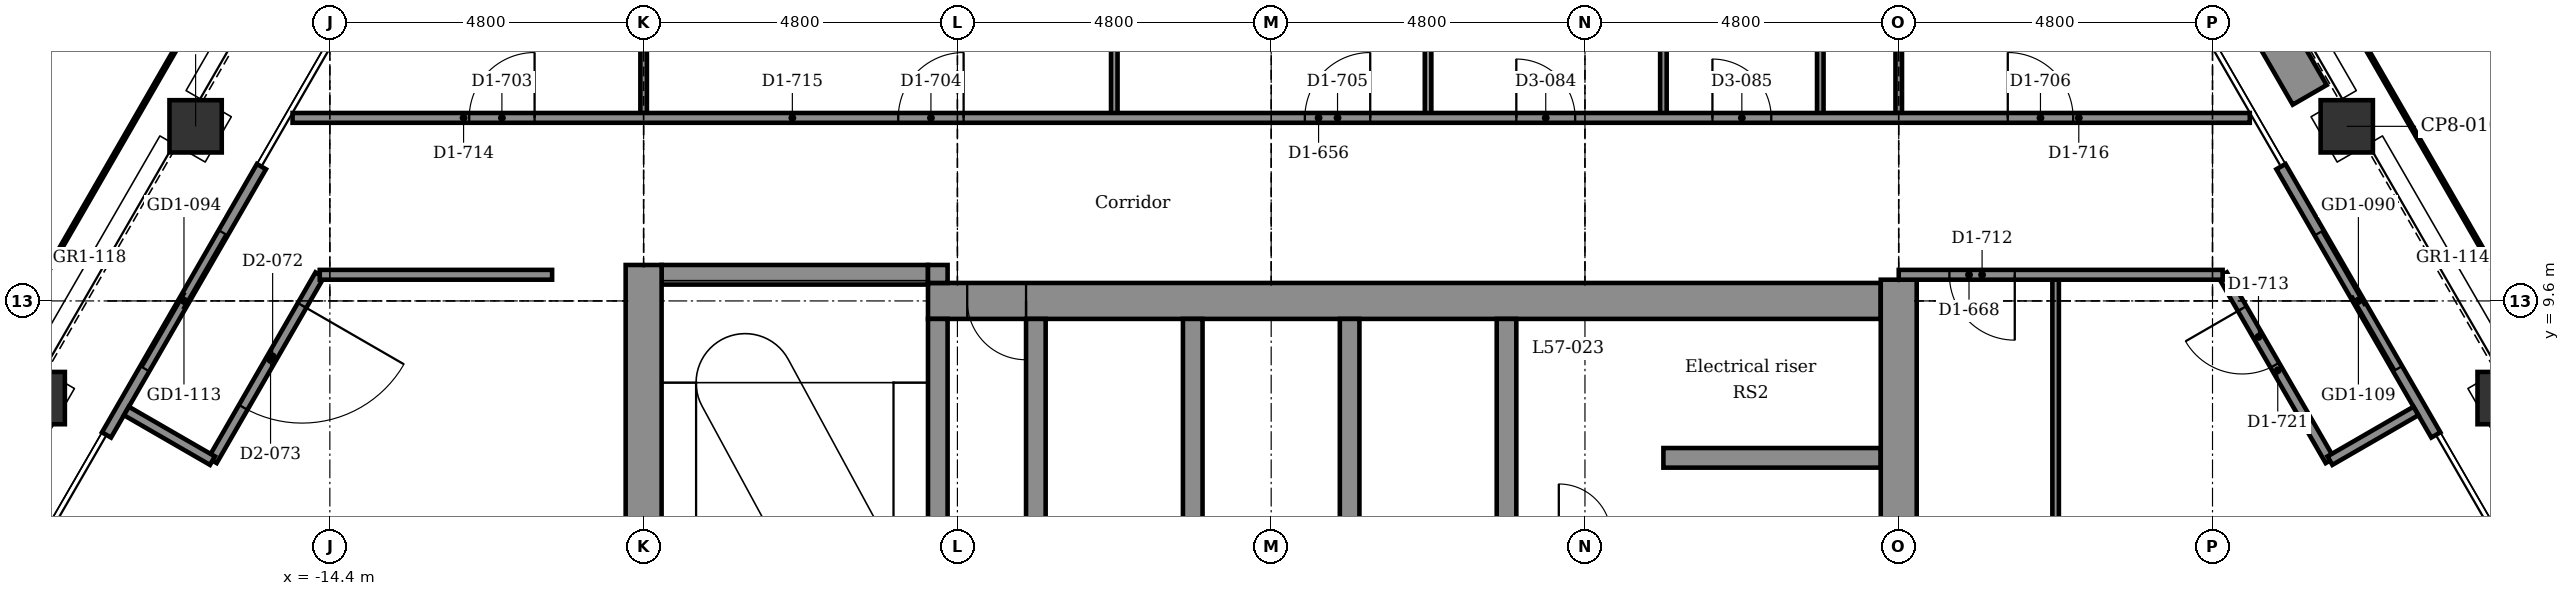
"""IFC4 building model, lengths in metres.
Left out: names, types, materials, properties, quantities, classifications, styles, units other than length and angle.
Written with IfcOpenShell. Run it as: python <this file> out.ifc"""

import sys

from ifc_helpers import new_model, si_unit, direction, frame, frame_2d, origin, origin_2d, place, context, subcontext, project, spatial, rectangle, extrude, element, fill, save


model = new_model("IFC4")
c1 = context("Model", 3, precision=1e-05, world=origin(), true_north=direction((0.0, 1.0)))
c2 = subcontext(c1, "Body", "Model", "MODEL_VIEW")
j1 = project(units=[si_unit("LENGTHUNIT", "METRE"), si_unit("PLANEANGLEUNIT", "RADIAN")], contexts=[c1])
p1 = place(None, origin())
s1 = spatial("IfcSite", under=j1, at=p1, CompositionType="ELEMENT")
p2 = place(p1, origin())
s2 = spatial("IfcBuilding", under=s1, at=p2, CompositionType="ELEMENT")
p3 = place(p2, frame((0.0, 0.0, 257.9)))
s3 = spatial("IfcBuildingStorey", under=s2, at=p3, CompositionType="ELEMENT", Elevation=257.9)
for number, where, z_axis, x_axis in (
    (1, (16.454, 12.271, -0.15), (0.0, 0.0, 1.0), (0.866, 0.5, 0.0)),
    (2, (18.854, 8.114, -0.15), (0.0, 0.0, 1.0), (0.866, 0.5, 0.0)),
    (3, (-18.854, 8.114, -0.15), (0.0, 0.0, 1.0), (0.5, 0.866, 0.0)),
    (4, (-16.454, 12.271, -0.15), (0.0, 0.0, 1.0), (0.5, 0.866, 0.0)),
):
    element("IfcColumn", number, at=place(p3, frame(where, z_axis=z_axis, x_axis=x_axis)), inside=s3, PredefinedType="COLUMN", context=c2, shape_type="SweptSolid", body=[
        extrude(rectangle(XDim=0.8, YDim=0.8, at=origin_2d()), origin(), (0.0, 0.0, 1.0), 3.9),
    ])
p4 = place(p3, frame((6.0, 7.2, -0.15), z_axis=(0.0, 0.0, 1.0), x_axis=(1.0, 0.0, 0.0)))
e5 = element("IfcWall", 5, at=p4, inside=s3, PredefinedType="STANDARD", context=c2, shape_type="SweptSolid", body=[
    extrude(rectangle(XDim=3.325, YDim=0.3, at=frame_2d((1.663, 0.0))), origin(), (0.0, 0.0, 1.0), 3.9),
])
p5 = place(p3, frame((-5.25, 9.6, -0.15), z_axis=(0.0, 0.0, 1.0), x_axis=(1.0, 0.0, 0.0)))
e6 = element("IfcWall", 6, at=p5, inside=s3, PredefinedType="SHEAR", context=c2, shape_type="SweptSolid", body=[
    extrude(rectangle(XDim=14.575, YDim=0.55, at=frame_2d((7.288, 0.0))), origin(), (0.0, 0.0, 1.0), 3.9),
])
p6 = place(p5, frame((0.6, 0.0, 0.15)))
e7 = element("IfcOpeningElement", 7, at=p6, cuts=e6, PredefinedType="OPENING", context=c2, shape_type="SweptSolid", body=[
    extrude(rectangle(XDim=0.9, YDim=2.1, at=frame_2d((0.45, 1.05))), frame((0.0, 0.285, 0.0), z_axis=(0.0, -1.0, 0.0), x_axis=(1.0, 0.0, 0.0)), (0.0, 0.0, 1.0), 0.57),
])
p7 = place(p3, frame((-9.325, 10.0, -0.15), z_axis=(0.0, 0.0, 1.0), x_axis=(1.0, 0.0, 0.0)))
e8 = element("IfcWall", 8, at=p7, inside=s3, PredefinedType="STANDARD", context=c2, shape_type="SweptSolid", body=[
    extrude(rectangle(XDim=4.075, YDim=0.3, at=frame_2d((2.038, 0.0))), origin(), (0.0, 0.0, 1.0), 3.9),
])
p8 = place(p3, frame((-9.6, 2.55, -0.15), z_axis=(0.0, 0.0, 1.0), x_axis=(0.0, 1.0, 0.0)))
e9 = element("IfcWall", 9, at=p8, inside=s3, PredefinedType="SHEAR", context=c2, shape_type="SweptSolid", body=[
    extrude(rectangle(XDim=7.6, YDim=0.55, at=frame_2d((3.8, 0.0))), origin(), (0.0, 0.0, 1.0), 3.9),
])
p9 = place(p3, frame((-5.1, 2.25, -0.15), z_axis=(0.0, 0.0, 1.0), x_axis=(0.0, 1.0, 0.0)))
e10 = element("IfcWall", 10, at=p9, inside=s3, PredefinedType="STANDARD", context=c2, shape_type="SweptSolid", body=[
    extrude(rectangle(XDim=7.075, YDim=0.3, at=frame_2d((3.538, 0.0))), origin(), (0.0, 0.0, 1.0), 3.9),
])
p10 = place(p9, frame((2.0, 0.0, 0.15)))
e11 = element("IfcOpeningElement", 11, at=p10, cuts=e10, PredefinedType="OPENING", context=c2, shape_type="SweptSolid", body=[
    extrude(rectangle(XDim=1.2, YDim=2.1, at=frame_2d((0.6, 1.05))), frame((0.0, 0.16, 0.0), z_axis=(0.0, -1.0, 0.0), x_axis=(1.0, 0.0, 0.0)), (0.0, 0.0, 1.0), 0.32),
])
p11 = place(p3, frame((-5.1, 9.875, -0.15), z_axis=(0.0, 0.0, 1.0), x_axis=(0.0, 1.0, 0.0)))
e12 = element("IfcWall", 12, at=p11, inside=s3, PredefinedType="STANDARD", context=c2, shape_type="SweptSolid", body=[
    extrude(rectangle(XDim=0.275, YDim=0.3, at=frame_2d((0.137, 0.0))), origin(), (0.0, 0.0, 1.0), 3.9),
])
for number, where, z_axis, x_axis in (
    (13, (-3.6, 5.85, -0.15), (0.0, 0.0, 1.0), (0.0, 1.0, 0.0)),
    (14, (-1.2, 5.85, -0.15), (0.0, 0.0, 1.0), (0.0, 1.0, 0.0)),
    (15, (1.2, 5.85, -0.15), (0.0, 0.0, 1.0), (0.0, 1.0, 0.0)),
    (16, (3.6, 5.85, -0.15), (0.0, 0.0, 1.0), (0.0, 1.0, 0.0)),
):
    element("IfcWall", number, at=place(p3, frame(where, z_axis=z_axis, x_axis=x_axis)), inside=s3, PredefinedType="STANDARD", context=c2, shape_type="SweptSolid", body=[
        extrude(rectangle(XDim=3.475, YDim=0.3, at=frame_2d((1.737, 0.0))), origin(), (0.0, 0.0, 1.0), 3.9),
    ])
p12 = place(p3, frame((9.6, -10.15, -0.15), z_axis=(0.0, 0.0, 1.0), x_axis=(0.0, 1.0, 0.0)))
e17 = element("IfcWall", 17, at=p12, inside=s3, PredefinedType="SHEAR", context=c2, shape_type="SweptSolid", body=[
    extrude(rectangle(XDim=20.075, YDim=0.55, at=frame_2d((10.038, 0.0))), origin(), (0.0, 0.0, 1.0), 3.9),
])
p13 = place(p3, frame((15.447, 11.655, 0.0), z_axis=(0.0, 0.0, 1.0), x_axis=(0.499978080042, -0.866038058908, 0.0)))
e18 = element("IfcWall", 18, at=p13, inside=s3, PredefinedType="PARTITIONING", context=c2, shape_type="SweptSolid", body=[
    extrude(rectangle(XDim=4.74, YDim=0.16, at=frame_2d((2.37, 0.0))), origin(), (0.0, 0.0, 1.0), 3.75),
])
p14 = place(p13, frame((1.17, 0.0, 0.0)))
e19 = element("IfcOpeningElement", 19, at=p14, cuts=e18, PredefinedType="OPENING", context=c2, shape_type="SweptSolid", body=[
    extrude(rectangle(XDim=2.4, YDim=2.4, at=frame_2d((1.2, 1.2))), frame((0.0, 0.09, 0.0), z_axis=(0.0, -1.0, 0.0), x_axis=(1.0, 0.0, 0.0)), (0.0, 0.0, 1.0), 0.18),
])
p15 = place(p3, frame((-17.817, 7.55, 0.0), z_axis=(0.0, 0.0, 1.0), x_axis=(0.499978080042, 0.866038058908, 0.0)))
e20 = element("IfcWall", 20, at=p15, inside=s3, PredefinedType="PARTITIONING", context=c2, shape_type="SweptSolid", body=[
    extrude(rectangle(XDim=4.74, YDim=0.16, at=frame_2d((2.37, 0.0))), origin(), (0.0, 0.0, 1.0), 3.75),
])
p16 = place(p15, frame((1.17, 0.0, 0.0)))
e21 = element("IfcOpeningElement", 21, at=p16, cuts=e20, PredefinedType="OPENING", context=c2, shape_type="SweptSolid", body=[
    extrude(rectangle(XDim=2.4, YDim=2.4, at=frame_2d((1.2, 1.2))), frame((0.0, 0.09, 0.0), z_axis=(0.0, -1.0, 0.0), x_axis=(1.0, 0.0, 0.0)), (0.0, 0.0, 1.0), 0.18),
])
p17 = place(p3, frame((14.187, 15.697, 0.0), z_axis=(0.0, 0.0, 1.0), x_axis=(0.499977295307, -0.866038511948, 0.0)))
e22 = element("IfcWall", 22, at=p17, inside=s3, PredefinedType="USERDEFINED", context=c2, shape_type="SweptSolid", body=[
    extrude(rectangle(XDim=3.4, YDim=0.6, at=frame_2d((1.7, 0.0))), origin(), (0.0, 0.0, 1.0), 0.7),
])
p18 = place(p3, frame((12.0, -10.0, 0.0), z_axis=(0.0, 0.0, 1.0), x_axis=(0.0, 1.0, 0.0)))
e23 = element("IfcWall", 23, at=p18, inside=s3, PredefinedType="PARTITIONING", context=c2, shape_type="SweptSolid", body=[
    extrude(rectangle(XDim=20.0, YDim=0.1, at=frame_2d((10.0, 0.0))), origin(), (0.0, 0.0, 1.0), 3.75),
])
p19 = place(p3, frame((9.6, 12.4, 0.0), z_axis=(0.0, 0.0, 1.0), x_axis=(0.0, 1.0, 0.0)))
e24 = element("IfcWall", 24, at=p19, inside=s3, PredefinedType="PARTITIONING", context=c2, shape_type="SweptSolid", body=[
    extrude(rectangle(XDim=6.715, YDim=0.1, at=frame_2d((3.357, 0.0))), origin(), (0.0, 0.0, 1.0), 3.217),
])
for number, where, z_axis, x_axis in (
    (25, (8.4, 12.4, 0.0), (0.0, 0.0, 1.0), (0.0, 1.0, 0.0)),
    (26, (6.0, 12.4, 0.0), (0.0, 0.0, 1.0), (0.0, 1.0, 0.0)),
    (27, (2.4, 12.4, 0.0), (0.0, 0.0, 1.0), (0.0, 1.0, 0.0)),
):
    element("IfcWall", number, at=place(p3, frame(where, z_axis=z_axis, x_axis=x_axis)), inside=s3, PredefinedType="PARTITIONING", context=c2, shape_type="SweptSolid", body=[
        extrude(rectangle(XDim=4.8, YDim=0.1, at=frame_2d((2.4, 0.0))), origin(), (0.0, 0.0, 1.0), 3.75),
    ])
p20 = place(p3, frame((-2.4, 12.4, 0.0), z_axis=(0.0, 0.0, 1.0), x_axis=(0.0, 1.0, 0.0)))
e28 = element("IfcWall", 28, at=p20, inside=s3, PredefinedType="PARTITIONING", context=c2, shape_type="SweptSolid", body=[
    extrude(rectangle(XDim=6.725, YDim=0.1, at=frame_2d((3.362, 0.0))), origin(), (0.0, 0.0, 1.0), 3.75),
])
p21 = place(p3, frame((-9.6, 12.4, 0.0), z_axis=(0.0, 0.0, 1.0), x_axis=(0.0, 1.0, 0.0)))
e29 = element("IfcWall", 29, at=p21, inside=s3, PredefinedType="PARTITIONING", context=c2, shape_type="SweptSolid", body=[
    extrude(rectangle(XDim=6.715, YDim=0.1, at=frame_2d((3.357, 0.0))), origin(), (0.0, 0.0, 1.0), 3.293),
])
p22 = place(p3, frame((14.555, 10.0, 0.0), z_axis=(0.0, 0.0, 1.0), x_axis=(0.499954196102, -0.866051847062, 0.0)))
e30 = element("IfcWall", 30, at=p22, inside=s3, PredefinedType="PARTITIONING", context=c2, shape_type="SweptSolid", body=[
    extrude(rectangle(XDim=3.283, YDim=0.15, at=frame_2d((1.642, 0.0))), origin(), (0.0, 0.0, 1.0), 3.75),
])
p23 = place(p22, frame((0.597, 0.0, 0.0)))
e31 = element("IfcOpeningElement", 31, at=p23, cuts=e30, PredefinedType="OPENING", context=c2, shape_type="SweptSolid", body=[
    extrude(rectangle(XDim=1.0, YDim=2.1, at=frame_2d((0.5, 1.05))), frame((0.0, 0.085, 0.0), z_axis=(0.0, -1.0, 0.0), x_axis=(1.0, 0.0, 0.0)), (0.0, 0.0, 1.0), 0.17),
])
p24 = place(p3, frame((-16.196, 7.157, 0.0), z_axis=(0.0, 0.0, 1.0), x_axis=(0.499954196102, 0.866051847062, 0.0)))
e32 = element("IfcWall", 32, at=p24, inside=s3, PredefinedType="PARTITIONING", context=c2, shape_type="SweptSolid", body=[
    extrude(rectangle(XDim=3.283, YDim=0.15, at=frame_2d((1.642, 0.0))), origin(), (0.0, 0.0, 1.0), 3.75),
])
p25 = place(p24, frame((0.941, 0.0, 0.0)))
e33 = element("IfcOpeningElement", 33, at=p25, cuts=e32, PredefinedType="OPENING", context=c2, shape_type="SweptSolid", body=[
    extrude(rectangle(XDim=1.8, YDim=2.1, at=frame_2d((0.9, 1.05))), frame((0.0, 0.085, 0.0), z_axis=(0.0, -1.0, 0.0), x_axis=(1.0, 0.0, 0.0)), (0.0, 0.0, 1.0), 0.17),
])
for number, where, z_axis, x_axis in (
    (34, (-17.512, 7.917, 0.0), (0.0, 0.0, 1.0), (0.866, -0.5, 0.0)),
    (35, (16.196, 7.157, 0.0), (0.0, 0.0, 1.0), (0.866, 0.5, 0.0)),
):
    element("IfcWall", number, at=place(p3, frame(where, z_axis=z_axis, x_axis=x_axis)), inside=s3, PredefinedType="PARTITIONING", context=c2, shape_type="SweptSolid", body=[
        extrude(rectangle(XDim=1.52, YDim=0.15, at=frame_2d((0.76, 0.0))), origin(), (0.0, 0.0, 1.0), 3.75),
    ])
p26 = place(p3, frame((-14.555, 10.0, 0.0), z_axis=(0.0, 0.0, 1.0), x_axis=(1.0, 0.0, 0.0)))
e36 = element("IfcWall", 36, at=p26, inside=s3, PredefinedType="PARTITIONING", context=c2, shape_type="SweptSolid", body=[
    extrude(rectangle(XDim=3.555, YDim=0.15, at=frame_2d((1.777, 0.0))), origin(), (0.0, 0.0, 1.0), 3.75),
])
p27 = place(p3, frame((9.6, 10.0, 0.0), z_axis=(0.0, 0.0, 1.0), x_axis=(1.0, 0.0, 0.0)))
e37 = element("IfcWall", 37, at=p27, inside=s3, PredefinedType="PARTITIONING", context=c2, shape_type="SweptSolid", body=[
    extrude(rectangle(XDim=4.955, YDim=0.15, at=frame_2d((2.477, 0.0))), origin(), (0.0, 0.0, 1.0), 3.75),
])
p28 = place(p27, frame((0.775, 0.0, 0.0)))
e38 = element("IfcOpeningElement", 38, at=p28, cuts=e37, PredefinedType="OPENING", context=c2, shape_type="SweptSolid", body=[
    extrude(rectangle(XDim=1.0, YDim=2.1, at=frame_2d((0.5, 1.05))), frame((0.0, 0.085, 0.0), z_axis=(0.0, -1.0, 0.0), x_axis=(1.0, 0.0, 0.0)), (0.0, 0.0, 1.0), 0.17),
])
p29 = place(p3, frame((-14.97, 12.4, 0.0), z_axis=(0.0, 0.0, 1.0), x_axis=(1.0, 0.0, 0.0)))
e39 = element("IfcWall", 39, at=p29, inside=s3, PredefinedType="PARTITIONING", context=c2, shape_type="SweptSolid", body=[
    extrude(rectangle(XDim=29.94, YDim=0.15, at=frame_2d((14.97, 0.0))), origin(), (0.0, 0.0, 1.0), 3.75),
])
p30 = place(p29, frame((18.72, 0.0, 0.0)))
e40 = element("IfcOpeningElement", 40, at=p30, cuts=e39, PredefinedType="OPENING", context=c2, shape_type="SweptSolid", body=[
    extrude(rectangle(XDim=0.9, YDim=2.1, at=frame_2d((0.45, 1.05))), frame((0.0, 0.085, 0.0), z_axis=(0.0, -1.0, 0.0), x_axis=(1.0, 0.0, 0.0)), (0.0, 0.0, 1.0), 0.17),
])
p31 = place(p29, frame((21.72, 0.0, 0.0)))
e41 = element("IfcOpeningElement", 41, at=p31, cuts=e39, PredefinedType="OPENING", context=c2, shape_type="SweptSolid", body=[
    extrude(rectangle(XDim=0.9, YDim=2.1, at=frame_2d((0.45, 1.05))), frame((0.0, 0.085, 0.0), z_axis=(0.0, -1.0, 0.0), x_axis=(1.0, 0.0, 0.0)), (0.0, 0.0, 1.0), 0.17),
])
p32 = place(p29, frame((2.702, 0.0, 0.0)))
e42 = element("IfcOpeningElement", 42, at=p32, cuts=e39, PredefinedType="OPENING", context=c2, shape_type="SweptSolid", body=[
    extrude(rectangle(XDim=1.0, YDim=2.1, at=frame_2d((0.5, 1.05))), frame((0.0, 0.085, 0.0), z_axis=(0.0, -1.0, 0.0), x_axis=(1.0, 0.0, 0.0)), (0.0, 0.0, 1.0), 0.17),
])
p33 = place(p29, frame((9.265, 0.0, 0.0)))
e43 = element("IfcOpeningElement", 43, at=p33, cuts=e39, PredefinedType="OPENING", context=c2, shape_type="SweptSolid", body=[
    extrude(rectangle(XDim=1.0, YDim=2.1, at=frame_2d((0.5, 1.05))), frame((0.0, 0.085, 0.0), z_axis=(0.0, -1.0, 0.0), x_axis=(1.0, 0.0, 0.0)), (0.0, 0.0, 1.0), 0.17),
])
p34 = place(p29, frame((15.485, 0.0, 0.0)))
e44 = element("IfcOpeningElement", 44, at=p34, cuts=e39, PredefinedType="OPENING", context=c2, shape_type="SweptSolid", body=[
    extrude(rectangle(XDim=1.0, YDim=2.1, at=frame_2d((0.5, 1.05))), frame((0.0, 0.085, 0.0), z_axis=(0.0, -1.0, 0.0), x_axis=(1.0, 0.0, 0.0)), (0.0, 0.0, 1.0), 0.17),
])
p35 = place(p29, frame((26.238, 0.0, 0.0)))
e45 = element("IfcOpeningElement", 45, at=p35, cuts=e39, PredefinedType="OPENING", context=c2, shape_type="SweptSolid", body=[
    extrude(rectangle(XDim=1.0, YDim=2.1, at=frame_2d((0.5, 1.05))), frame((0.0, 0.085, 0.0), z_axis=(0.0, -1.0, 0.0), x_axis=(1.0, 0.0, 0.0)), (0.0, 0.0, 1.0), 0.17),
])
p36 = place(p14, origin())
e46 = element("IfcDoor", 46, at=p36, inside=s3, OperationType="DOUBLE_DOOR_SLIDING", PredefinedType="DOOR", context=c2, shape_type="SweptSolid", body=[
    extrude(rectangle(XDim=2.4, YDim=2.4, at=frame_2d((1.2, 1.2))), frame((0.0, 0.025, 0.0), z_axis=(0.0, -1.0, 0.0), x_axis=(1.0, 0.0, 0.0)), (0.0, 0.0, 1.0), 0.05),
])
fill(e19, e46)
p37 = place(p16, origin())
e47 = element("IfcDoor", 47, at=p37, inside=s3, OperationType="DOUBLE_DOOR_SLIDING", PredefinedType="DOOR", context=c2, shape_type="SweptSolid", body=[
    extrude(rectangle(XDim=2.4, YDim=2.4, at=frame_2d((1.2, 1.2))), frame((0.0, 0.025, 0.0), z_axis=(0.0, -1.0, 0.0), x_axis=(1.0, 0.0, 0.0)), (0.0, 0.0, 1.0), 0.05),
])
fill(e21, e47)
p38 = place(p30, origin())
e48 = element("IfcDoor", 48, at=p38, inside=s3, OperationType="SINGLE_SWING_LEFT", PredefinedType="DOOR", context=c2, shape_type="SweptSolid", body=[
    extrude(rectangle(XDim=0.9, YDim=2.1, at=frame_2d((0.45, 1.05))), frame((0.0, 0.025, 0.0), z_axis=(0.0, -1.0, 0.0), x_axis=(1.0, 0.0, 0.0)), (0.0, 0.0, 1.0), 0.05),
])
fill(e40, e48)
p39 = place(p31, origin())
e49 = element("IfcDoor", 49, at=p39, inside=s3, OperationType="SINGLE_SWING_LEFT", PredefinedType="DOOR", context=c2, shape_type="SweptSolid", body=[
    extrude(rectangle(XDim=0.9, YDim=2.1, at=frame_2d((0.45, 1.05))), frame((0.0, 0.025, 0.0), z_axis=(0.0, -1.0, 0.0), x_axis=(1.0, 0.0, 0.0)), (0.0, 0.0, 1.0), 0.05),
])
fill(e41, e49)
p40 = place(p32, origin())
e50 = element("IfcDoor", 50, at=p40, inside=s3, OperationType="SINGLE_SWING_RIGHT", PredefinedType="DOOR", context=c2, shape_type="SweptSolid", body=[
    extrude(rectangle(XDim=1.0, YDim=2.1, at=frame_2d((0.5, 1.05))), frame((0.0, 0.025, 0.0), z_axis=(0.0, -1.0, 0.0), x_axis=(1.0, 0.0, 0.0)), (0.0, 0.0, 1.0), 0.05),
])
fill(e42, e50)
p41 = place(p33, origin())
e51 = element("IfcDoor", 51, at=p41, inside=s3, OperationType="SINGLE_SWING_RIGHT", PredefinedType="DOOR", context=c2, shape_type="SweptSolid", body=[
    extrude(rectangle(XDim=1.0, YDim=2.1, at=frame_2d((0.5, 1.05))), frame((0.0, 0.025, 0.0), z_axis=(0.0, -1.0, 0.0), x_axis=(1.0, 0.0, 0.0)), (0.0, 0.0, 1.0), 0.05),
])
fill(e43, e51)
p42 = place(p34, origin())
e52 = element("IfcDoor", 52, at=p42, inside=s3, OperationType="SINGLE_SWING_RIGHT", PredefinedType="DOOR", context=c2, shape_type="SweptSolid", body=[
    extrude(rectangle(XDim=1.0, YDim=2.1, at=frame_2d((0.5, 1.05))), frame((0.0, 0.025, 0.0), z_axis=(0.0, -1.0, 0.0), x_axis=(1.0, 0.0, 0.0)), (0.0, 0.0, 1.0), 0.05),
])
fill(e44, e52)
p43 = place(p35, origin())
e53 = element("IfcDoor", 53, at=p43, inside=s3, OperationType="SINGLE_SWING_LEFT", PredefinedType="DOOR", context=c2, shape_type="SweptSolid", body=[
    extrude(rectangle(XDim=1.0, YDim=2.1, at=frame_2d((0.5, 1.05))), frame((0.0, 0.025, 0.0), z_axis=(0.0, -1.0, 0.0), x_axis=(1.0, 0.0, 0.0)), (0.0, 0.0, 1.0), 0.05),
])
fill(e45, e53)
p44 = place(p28, frame((1.0, 0.0, 0.0), z_axis=(0.0, 0.0, 1.0), x_axis=(-1.0, 0.0, 0.0)))
e54 = element("IfcDoor", 54, at=p44, inside=s3, OperationType="SINGLE_SWING_RIGHT", PredefinedType="DOOR", context=c2, shape_type="SweptSolid", body=[
    extrude(rectangle(XDim=1.0, YDim=2.1, at=frame_2d((0.5, 1.05))), frame((0.0, 0.025, 0.0), z_axis=(0.0, -1.0, 0.0), x_axis=(1.0, 0.0, 0.0)), (0.0, 0.0, 1.0), 0.05),
])
fill(e38, e54)
p45 = place(p23, frame((1.0, 0.0, 0.0), z_axis=(0.0, 0.0, 1.0), x_axis=(-1.0, 0.0, 0.0)))
e55 = element("IfcDoor", 55, at=p45, inside=s3, OperationType="SINGLE_SWING_LEFT", PredefinedType="DOOR", context=c2, shape_type="SweptSolid", body=[
    extrude(rectangle(XDim=1.0, YDim=2.1, at=frame_2d((0.5, 1.05))), frame((0.0, 0.025, 0.0), z_axis=(0.0, -1.0, 0.0), x_axis=(1.0, 0.0, 0.0)), (0.0, 0.0, 1.0), 0.05),
])
fill(e31, e55)
p46 = place(p25, frame((1.8, 0.0, 0.0), z_axis=(0.0, 0.0, 1.0), x_axis=(-1.0, 0.0, 0.0)))
e56 = element("IfcDoor", 56, at=p46, inside=s3, OperationType="SINGLE_SWING_RIGHT", PredefinedType="DOOR", context=c2, shape_type="SweptSolid", body=[
    extrude(rectangle(XDim=1.8, YDim=2.1, at=frame_2d((0.9, 1.05))), frame((0.0, 0.025, 0.0), z_axis=(0.0, -1.0, 0.0), x_axis=(1.0, 0.0, 0.0)), (0.0, 0.0, 1.0), 0.05),
])
fill(e33, e56)
p47 = place(p6, frame((0.9, 0.0, 0.0), z_axis=(0.0, 0.0, 1.0), x_axis=(-1.0, 0.0, 0.0)))
e57 = element("IfcDoor", 57, at=p47, inside=s3, OperationType="SINGLE_SWING_RIGHT", PredefinedType="DOOR", context=c2, shape_type="SweptSolid", body=[
    extrude(rectangle(XDim=0.9, YDim=2.1, at=frame_2d((0.45, 1.05))), frame((0.0, 0.025, 0.0), z_axis=(0.0, -1.0, 0.0), x_axis=(1.0, 0.0, 0.0)), (0.0, 0.0, 1.0), 0.05),
])
fill(e7, e57)
save(model, sys.argv[1])
